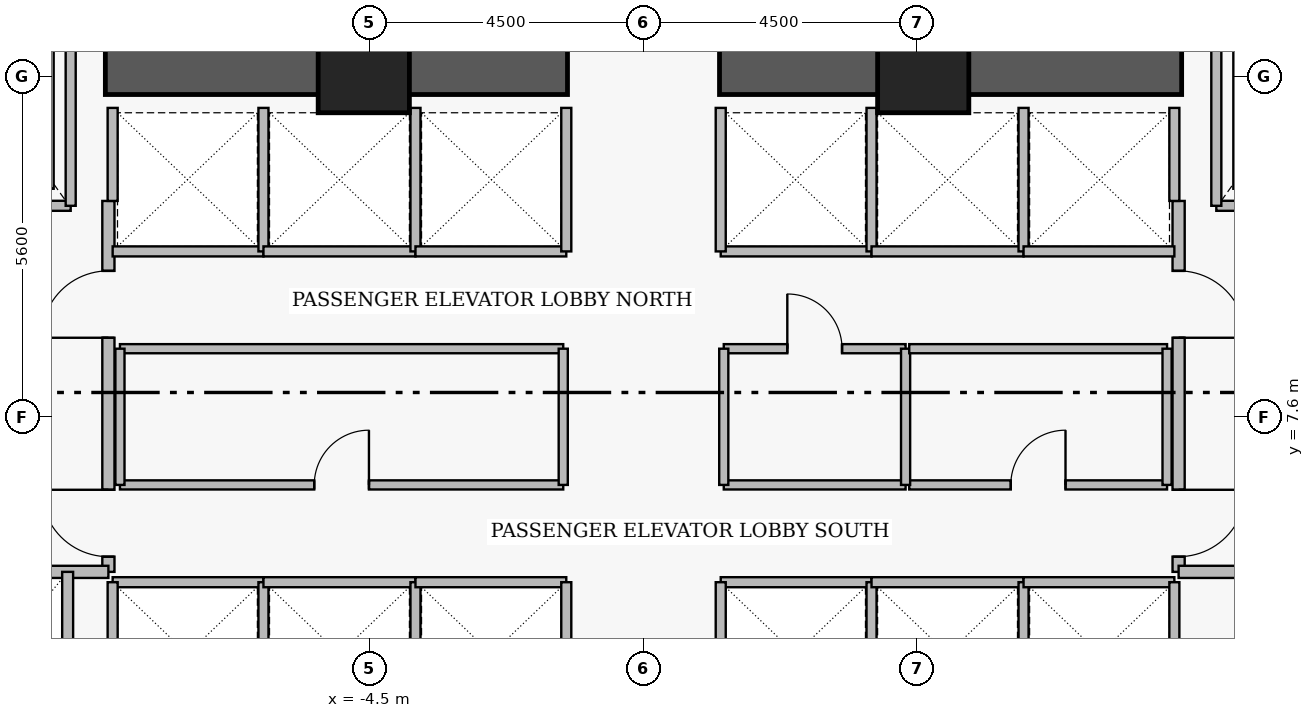
"""IFC4 building model, lengths in metres.
Left out: names, types, materials, properties, quantities, classifications, styles, units other than length and angle.
Written with IfcOpenShell. Run it as: python <this file> out.ifc"""

import sys

from ifc_helpers import new_model, si_unit, direction, frame, frame_2d, origin, origin_2d, place, context, subcontext, project, spatial, rectangle, extrude, element, fill, save


model = new_model("IFC4")
c1 = context("Model", 3, precision=1e-05, world=origin(), true_north=direction((0.0, 1.0)))
c2 = subcontext(c1, "Body", "Model", "MODEL_VIEW")
j1 = project(units=[si_unit("LENGTHUNIT", "METRE"), si_unit("PLANEANGLEUNIT", "RADIAN")], contexts=[c1])
p1 = place(None, origin())
s1 = spatial("IfcSite", under=j1, at=p1, CompositionType="ELEMENT")
p2 = place(p1, origin())
s2 = spatial("IfcBuilding", under=s1, at=p2, CompositionType="ELEMENT")
p3 = place(p2, frame((0.0, 0.0, 89.65)))
s3 = spatial("IfcBuildingStorey", under=s2, at=p3, CompositionType="ELEMENT", Elevation=89.65)
for number, where, z_axis, x_axis in (
    (1, (-8.85, 13.35, 0.0), (0.0, 0.0, 1.0), (1.0, 0.0, 0.0)),
    (2, (1.25, 13.35, 0.0), (0.0, 0.0, 1.0), (1.0, 0.0, 0.0)),
):
    element("IfcWall", number, at=place(p3, frame(where, z_axis=z_axis, x_axis=x_axis)), inside=s3, PredefinedType="SHEAR", context=c2, shape_type="SweptSolid", body=[
        extrude(rectangle(XDim=7.6, YDim=0.9, at=frame_2d((3.8, 0.0))), origin(), (0.0, 0.0, 1.0), 5.74),
    ])
for number, where, z_axis, x_axis in (
    (3, (-4.6, 13.35, 0.0), (0.0, 0.0, 1.0), (1.0, 0.0, 0.0)),
    (4, (4.6, 13.35, 0.0), (0.0, 0.0, 1.0), (1.0, 0.0, 0.0)),
):
    element("IfcColumn", number, at=place(p3, frame(where, z_axis=z_axis, x_axis=x_axis)), inside=s3, PredefinedType="COLUMN", context=c2, shape_type="SweptSolid", body=[
        extrude(rectangle(XDim=1.5, YDim=1.5, at=origin_2d()), origin(), (0.0, 0.0, 1.0), 6.0),
    ])
p4 = place(p3, frame((-8.8, 5.05, 0.0), z_axis=(0.0, 0.0, 1.0), x_axis=(0.0, 1.0, 0.0)))
e5 = element("IfcWall", 5, at=p4, inside=s3, PredefinedType="PARTITIONING", context=c2, shape_type="SweptSolid", body=[
    extrude(rectangle(XDim=6.1, YDim=0.2, at=frame_2d((3.05, 0.0))), origin(), (0.0, 0.0, 1.0), 5.74),
])
p5 = place(p4, frame((0.25, 0.0, 0.0)))
e6 = element("IfcOpeningElement", 6, at=p5, cuts=e5, PredefinedType="OPENING", context=c2, shape_type="SweptSolid", body=[
    extrude(rectangle(XDim=1.1, YDim=2.2, at=frame_2d((0.55, 1.1))), frame((0.0, 0.11, 0.0), z_axis=(0.0, -1.0, 0.0), x_axis=(1.0, 0.0, 0.0)), (0.0, 0.0, 1.0), 0.22),
])
p6 = place(p4, frame((3.85, 0.0, 0.0)))
e7 = element("IfcOpeningElement", 7, at=p6, cuts=e5, PredefinedType="OPENING", context=c2, shape_type="SweptSolid", body=[
    extrude(rectangle(XDim=1.1, YDim=2.2, at=frame_2d((0.55, 1.1))), frame((0.0, 0.11, 0.0), z_axis=(0.0, -1.0, 0.0), x_axis=(1.0, 0.0, 0.0)), (0.0, 0.0, 1.0), 0.22),
])
p7 = place(p3, frame((8.8, 11.15, 0.0), z_axis=(0.0, 0.0, 1.0), x_axis=(0.0, -1.0, 0.0)))
e8 = element("IfcWall", 8, at=p7, inside=s3, PredefinedType="PARTITIONING", context=c2, shape_type="SweptSolid", body=[
    extrude(rectangle(XDim=6.1, YDim=0.2, at=frame_2d((3.05, 0.0))), origin(), (0.0, 0.0, 1.0), 5.74),
])
p8 = place(p7, frame((1.15, 0.0, 0.0)))
e9 = element("IfcOpeningElement", 9, at=p8, cuts=e8, PredefinedType="OPENING", context=c2, shape_type="SweptSolid", body=[
    extrude(rectangle(XDim=1.1, YDim=2.2, at=frame_2d((0.55, 1.1))), frame((0.0, 0.11, 0.0), z_axis=(0.0, -1.0, 0.0), x_axis=(1.0, 0.0, 0.0)), (0.0, 0.0, 1.0), 0.22),
])
p9 = place(p7, frame((4.75, 0.0, 0.0)))
e10 = element("IfcOpeningElement", 10, at=p9, cuts=e8, PredefinedType="OPENING", context=c2, shape_type="SweptSolid", body=[
    extrude(rectangle(XDim=1.1, YDim=2.2, at=frame_2d((0.55, 1.1))), frame((0.0, 0.11, 0.0), z_axis=(0.0, -1.0, 0.0), x_axis=(1.0, 0.0, 0.0)), (0.0, 0.0, 1.0), 0.22),
])
p10 = place(p3, frame((-11.58, 11.07, 0.0), z_axis=(0.0, 0.0, 1.0), x_axis=(1.0, 0.0, 0.0)))
e11 = element("IfcWall", 11, at=p10, inside=s3, PredefinedType="PARTITIONING", context=c2, shape_type="SweptSolid", body=[
    extrude(rectangle(XDim=2.16, YDim=0.165, at=frame_2d((1.08, 0.0))), origin(), (0.0, 0.0, 1.0), 5.74),
])
p11 = place(p10, frame((0.53, 0.0, 0.0)))
e12 = element("IfcOpeningElement", 12, at=p11, cuts=e11, PredefinedType="OPENING", context=c2, shape_type="SweptSolid", body=[
    extrude(rectangle(XDim=1.15, YDim=2.25, at=frame_2d((0.575, 1.125))), frame((0.0, 0.093, 0.0), z_axis=(0.0, -1.0, 0.0), x_axis=(1.0, 0.0, 0.0)), (0.0, 0.0, 1.0), 0.185),
])
p12 = place(p3, frame((9.42, 11.07, 0.0), z_axis=(0.0, 0.0, 1.0), x_axis=(1.0, 0.0, 0.0)))
e13 = element("IfcWall", 13, at=p12, inside=s3, PredefinedType="PARTITIONING", context=c2, shape_type="SweptSolid", body=[
    extrude(rectangle(XDim=2.16, YDim=0.165, at=frame_2d((1.08, 0.0))), origin(), (0.0, 0.0, 1.0), 5.74),
])
p13 = place(p12, frame((0.53, 0.0, 0.0)))
e14 = element("IfcOpeningElement", 14, at=p13, cuts=e13, PredefinedType="OPENING", context=c2, shape_type="SweptSolid", body=[
    extrude(rectangle(XDim=1.15, YDim=2.25, at=frame_2d((0.575, 1.125))), frame((0.0, 0.093, 0.0), z_axis=(0.0, -1.0, 0.0), x_axis=(1.0, 0.0, 0.0)), (0.0, 0.0, 1.0), 0.185),
])
p14 = place(p3, frame((-8.61, 6.48, 0.0), z_axis=(0.0, 0.0, 1.0), x_axis=(1.0, 0.0, 0.0)))
e15 = element("IfcWall", 15, at=p14, inside=s3, PredefinedType="PARTITIONING", context=c2, shape_type="SweptSolid", body=[
    extrude(rectangle(XDim=7.29, YDim=0.15, at=frame_2d((3.645, 0.0))), origin(), (0.0, 0.0, 1.0), 5.74),
])
p15 = place(p14, frame((3.195, 0.0, 0.0)))
e16 = element("IfcOpeningElement", 16, at=p15, cuts=e15, PredefinedType="OPENING", context=c2, shape_type="SweptSolid", body=[
    extrude(rectangle(XDim=0.9, YDim=2.15, at=frame_2d((0.45, 1.075))), frame((0.0, 0.085, 0.0), z_axis=(0.0, -1.0, 0.0), x_axis=(1.0, 0.0, 0.0)), (0.0, 0.0, 1.0), 0.17),
])
p16 = place(p3, frame((1.32, 8.72, 0.0), z_axis=(0.0, 0.0, 1.0), x_axis=(1.0, 0.0, 0.0)))
e17 = element("IfcWall", 17, at=p16, inside=s3, PredefinedType="PARTITIONING", context=c2, shape_type="SweptSolid", body=[
    extrude(rectangle(XDim=2.99, YDim=0.15, at=frame_2d((1.495, 0.0))), origin(), (0.0, 0.0, 1.0), 5.74),
])
p17 = place(p16, frame((1.045, 0.0, 0.0)))
e18 = element("IfcOpeningElement", 18, at=p17, cuts=e17, PredefinedType="OPENING", context=c2, shape_type="SweptSolid", body=[
    extrude(rectangle(XDim=0.9, YDim=2.15, at=frame_2d((0.45, 1.075))), frame((0.0, 0.085, 0.0), z_axis=(0.0, -1.0, 0.0), x_axis=(1.0, 0.0, 0.0)), (0.0, 0.0, 1.0), 0.17),
])
p18 = place(p3, frame((4.37, 6.48, 0.0), z_axis=(0.0, 0.0, 1.0), x_axis=(1.0, 0.0, 0.0)))
e19 = element("IfcWall", 19, at=p18, inside=s3, PredefinedType="PARTITIONING", context=c2, shape_type="SweptSolid", body=[
    extrude(rectangle(XDim=4.24, YDim=0.15, at=frame_2d((2.12, 0.0))), origin(), (0.0, 0.0, 1.0), 5.74),
])
p19 = place(p18, frame((1.67, 0.0, 0.0)))
e20 = element("IfcOpeningElement", 20, at=p19, cuts=e19, PredefinedType="OPENING", context=c2, shape_type="SweptSolid", body=[
    extrude(rectangle(XDim=0.9, YDim=2.15, at=frame_2d((0.45, 1.075))), frame((0.0, 0.085, 0.0), z_axis=(0.0, -1.0, 0.0), x_axis=(1.0, 0.0, 0.0)), (0.0, 0.0, 1.0), 0.17),
])
for number, where, z_axis, x_axis in (
    (21, (-11.65, 5.05, 0.0), (0.0, 0.0, 1.0), (1.0, 0.0, 0.0)),
    (22, (8.8, 5.05, 0.0), (0.0, 0.0, 1.0), (1.0, 0.0, 0.0)),
):
    element("IfcWall", number, at=place(p3, frame(where, z_axis=z_axis, x_axis=x_axis)), inside=s3, PredefinedType="PARTITIONING", context=c2, shape_type="SweptSolid", body=[
        extrude(rectangle(XDim=2.85, YDim=0.2, at=frame_2d((1.425, 0.0))), origin(), (0.0, 0.0, 1.0), 5.74),
    ])
for number, where, z_axis, x_axis in (
    (23, (-9.42, 11.07, 0.0), (0.0, 0.0, 1.0), (0.0, 1.0, 0.0)),
    (24, (9.42, 11.07, 0.0), (0.0, 0.0, 1.0), (0.0, 1.0, 0.0)),
):
    element("IfcWall", number, at=place(p3, frame(where, z_axis=z_axis, x_axis=x_axis)), inside=s3, PredefinedType="PARTITIONING", context=c2, shape_type="SweptSolid", body=[
        extrude(rectangle(XDim=2.96, YDim=0.165, at=frame_2d((1.48, 0.0))), origin(), (0.0, 0.0, 1.0), 5.74),
    ])
p20 = place(p3, frame((-8.73, 4.88, 0.0), z_axis=(0.0, 0.0, 1.0), x_axis=(1.0, 0.0, 0.0)))
e25 = element("IfcWall", 25, at=p20, inside=s3, PredefinedType="PARTITIONING", context=c2, shape_type="SweptSolid", body=[
    extrude(rectangle(XDim=2.48, YDim=0.165, at=frame_2d((1.24, 0.0))), origin(), (0.0, 0.0, 1.0), 5.74),
])
for number, where, z_axis, x_axis in (
    (26, (-8.73, 2.52, 0.0), (0.0, 0.0, 1.0), (0.0, 1.0, 0.0)),
    (27, (-6.25, 2.52, 0.0), (0.0, 0.0, 1.0), (0.0, 1.0, 0.0)),
):
    element("IfcWall", number, at=place(p3, frame(where, z_axis=z_axis, x_axis=x_axis)), inside=s3, PredefinedType="PARTITIONING", context=c2, shape_type="SweptSolid", body=[
        extrude(rectangle(XDim=2.36, YDim=0.165, at=frame_2d((1.18, 0.0))), origin(), (0.0, 0.0, 1.0), 5.74),
    ])
p21 = place(p3, frame((-6.25, 4.88, 0.0), z_axis=(0.0, 0.0, 1.0), x_axis=(1.0, 0.0, 0.0)))
e28 = element("IfcWall", 28, at=p21, inside=s3, PredefinedType="PARTITIONING", context=c2, shape_type="SweptSolid", body=[
    extrude(rectangle(XDim=2.5, YDim=0.165, at=frame_2d((1.25, 0.0))), origin(), (0.0, 0.0, 1.0), 5.74),
])
p22 = place(p3, frame((-3.75, 2.52, 0.0), z_axis=(0.0, 0.0, 1.0), x_axis=(0.0, 1.0, 0.0)))
e29 = element("IfcWall", 29, at=p22, inside=s3, PredefinedType="PARTITIONING", context=c2, shape_type="SweptSolid", body=[
    extrude(rectangle(XDim=2.36, YDim=0.165, at=frame_2d((1.18, 0.0))), origin(), (0.0, 0.0, 1.0), 5.74),
])
p23 = place(p3, frame((-8.73, 10.32, 0.0), z_axis=(0.0, 0.0, 1.0), x_axis=(1.0, 0.0, 0.0)))
e30 = element("IfcWall", 30, at=p23, inside=s3, PredefinedType="PARTITIONING", context=c2, shape_type="SweptSolid", body=[
    extrude(rectangle(XDim=2.48, YDim=0.165, at=frame_2d((1.24, 0.0))), origin(), (0.0, 0.0, 1.0), 5.74),
])
p24 = place(p3, frame((-8.73, 11.15, 0.0), z_axis=(0.0, 0.0, 1.0), x_axis=(0.0, 1.0, 0.0)))
e31 = element("IfcWall", 31, at=p24, inside=s3, PredefinedType="PARTITIONING", context=c2, shape_type="SweptSolid", body=[
    extrude(rectangle(XDim=1.53, YDim=0.165, at=frame_2d((0.765, 0.0))), origin(), (0.0, 0.0, 1.0), 5.74),
])
p25 = place(p3, frame((-6.25, 10.32, 0.0), z_axis=(0.0, 0.0, 1.0), x_axis=(0.0, 1.0, 0.0)))
e32 = element("IfcWall", 32, at=p25, inside=s3, PredefinedType="PARTITIONING", context=c2, shape_type="SweptSolid", body=[
    extrude(rectangle(XDim=2.36, YDim=0.165, at=frame_2d((1.18, 0.0))), origin(), (0.0, 0.0, 1.0), 5.74),
])
p26 = place(p3, frame((-6.25, 10.32, 0.0), z_axis=(0.0, 0.0, 1.0), x_axis=(1.0, 0.0, 0.0)))
e33 = element("IfcWall", 33, at=p26, inside=s3, PredefinedType="PARTITIONING", context=c2, shape_type="SweptSolid", body=[
    extrude(rectangle(XDim=2.5, YDim=0.165, at=frame_2d((1.25, 0.0))), origin(), (0.0, 0.0, 1.0), 5.74),
])
p27 = place(p3, frame((-3.75, 10.32, 0.0), z_axis=(0.0, 0.0, 1.0), x_axis=(0.0, 1.0, 0.0)))
e34 = element("IfcWall", 34, at=p27, inside=s3, PredefinedType="PARTITIONING", context=c2, shape_type="SweptSolid", body=[
    extrude(rectangle(XDim=2.36, YDim=0.165, at=frame_2d((1.18, 0.0))), origin(), (0.0, 0.0, 1.0), 5.74),
])
p28 = place(p3, frame((-3.75, 4.88, 0.0), z_axis=(0.0, 0.0, 1.0), x_axis=(1.0, 0.0, 0.0)))
e35 = element("IfcWall", 35, at=p28, inside=s3, PredefinedType="PARTITIONING", context=c2, shape_type="SweptSolid", body=[
    extrude(rectangle(XDim=2.48, YDim=0.165, at=frame_2d((1.24, 0.0))), origin(), (0.0, 0.0, 1.0), 5.74),
])
p29 = place(p3, frame((-1.27, 2.52, 0.0), z_axis=(0.0, 0.0, 1.0), x_axis=(0.0, 1.0, 0.0)))
e36 = element("IfcWall", 36, at=p29, inside=s3, PredefinedType="PARTITIONING", context=c2, shape_type="SweptSolid", body=[
    extrude(rectangle(XDim=2.36, YDim=0.165, at=frame_2d((1.18, 0.0))), origin(), (0.0, 0.0, 1.0), 5.74),
])
p30 = place(p3, frame((1.27, 4.88, 0.0), z_axis=(0.0, 0.0, 1.0), x_axis=(1.0, 0.0, 0.0)))
e37 = element("IfcWall", 37, at=p30, inside=s3, PredefinedType="PARTITIONING", context=c2, shape_type="SweptSolid", body=[
    extrude(rectangle(XDim=2.48, YDim=0.165, at=frame_2d((1.24, 0.0))), origin(), (0.0, 0.0, 1.0), 5.74),
])
for number, where, z_axis, x_axis in (
    (38, (1.27, 2.52, 0.0), (0.0, 0.0, 1.0), (0.0, 1.0, 0.0)),
    (39, (3.75, 2.52, 0.0), (0.0, 0.0, 1.0), (0.0, 1.0, 0.0)),
):
    element("IfcWall", number, at=place(p3, frame(where, z_axis=z_axis, x_axis=x_axis)), inside=s3, PredefinedType="PARTITIONING", context=c2, shape_type="SweptSolid", body=[
        extrude(rectangle(XDim=2.36, YDim=0.165, at=frame_2d((1.18, 0.0))), origin(), (0.0, 0.0, 1.0), 5.74),
    ])
p31 = place(p3, frame((-3.75, 10.32, 0.0), z_axis=(0.0, 0.0, 1.0), x_axis=(1.0, 0.0, 0.0)))
e40 = element("IfcWall", 40, at=p31, inside=s3, PredefinedType="PARTITIONING", context=c2, shape_type="SweptSolid", body=[
    extrude(rectangle(XDim=2.48, YDim=0.165, at=frame_2d((1.24, 0.0))), origin(), (0.0, 0.0, 1.0), 5.74),
])
p32 = place(p3, frame((-1.27, 10.32, 0.0), z_axis=(0.0, 0.0, 1.0), x_axis=(0.0, 1.0, 0.0)))
e41 = element("IfcWall", 41, at=p32, inside=s3, PredefinedType="PARTITIONING", context=c2, shape_type="SweptSolid", body=[
    extrude(rectangle(XDim=2.36, YDim=0.165, at=frame_2d((1.18, 0.0))), origin(), (0.0, 0.0, 1.0), 5.74),
])
p33 = place(p3, frame((1.27, 10.32, 0.0), z_axis=(0.0, 0.0, 1.0), x_axis=(1.0, 0.0, 0.0)))
e42 = element("IfcWall", 42, at=p33, inside=s3, PredefinedType="PARTITIONING", context=c2, shape_type="SweptSolid", body=[
    extrude(rectangle(XDim=2.48, YDim=0.165, at=frame_2d((1.24, 0.0))), origin(), (0.0, 0.0, 1.0), 5.74),
])
for number, where, z_axis, x_axis in (
    (43, (1.27, 10.32, 0.0), (0.0, 0.0, 1.0), (0.0, 1.0, 0.0)),
    (44, (3.75, 10.32, 0.0), (0.0, 0.0, 1.0), (0.0, 1.0, 0.0)),
):
    element("IfcWall", number, at=place(p3, frame(where, z_axis=z_axis, x_axis=x_axis)), inside=s3, PredefinedType="PARTITIONING", context=c2, shape_type="SweptSolid", body=[
        extrude(rectangle(XDim=2.36, YDim=0.165, at=frame_2d((1.18, 0.0))), origin(), (0.0, 0.0, 1.0), 5.74),
    ])
p34 = place(p3, frame((3.75, 4.88, 0.0), z_axis=(0.0, 0.0, 1.0), x_axis=(1.0, 0.0, 0.0)))
e45 = element("IfcWall", 45, at=p34, inside=s3, PredefinedType="PARTITIONING", context=c2, shape_type="SweptSolid", body=[
    extrude(rectangle(XDim=2.5, YDim=0.165, at=frame_2d((1.25, 0.0))), origin(), (0.0, 0.0, 1.0), 5.74),
])
p35 = place(p3, frame((6.25, 2.52, 0.0), z_axis=(0.0, 0.0, 1.0), x_axis=(0.0, 1.0, 0.0)))
e46 = element("IfcWall", 46, at=p35, inside=s3, PredefinedType="PARTITIONING", context=c2, shape_type="SweptSolid", body=[
    extrude(rectangle(XDim=2.36, YDim=0.165, at=frame_2d((1.18, 0.0))), origin(), (0.0, 0.0, 1.0), 5.74),
])
p36 = place(p3, frame((6.25, 4.88, 0.0), z_axis=(0.0, 0.0, 1.0), x_axis=(1.0, 0.0, 0.0)))
e47 = element("IfcWall", 47, at=p36, inside=s3, PredefinedType="PARTITIONING", context=c2, shape_type="SweptSolid", body=[
    extrude(rectangle(XDim=2.48, YDim=0.165, at=frame_2d((1.24, 0.0))), origin(), (0.0, 0.0, 1.0), 5.74),
])
p37 = place(p3, frame((8.73, 2.52, 0.0), z_axis=(0.0, 0.0, 1.0), x_axis=(0.0, 1.0, 0.0)))
e48 = element("IfcWall", 48, at=p37, inside=s3, PredefinedType="PARTITIONING", context=c2, shape_type="SweptSolid", body=[
    extrude(rectangle(XDim=2.36, YDim=0.165, at=frame_2d((1.18, 0.0))), origin(), (0.0, 0.0, 1.0), 5.74),
])
p38 = place(p3, frame((3.75, 10.32, 0.0), z_axis=(0.0, 0.0, 1.0), x_axis=(1.0, 0.0, 0.0)))
e49 = element("IfcWall", 49, at=p38, inside=s3, PredefinedType="PARTITIONING", context=c2, shape_type="SweptSolid", body=[
    extrude(rectangle(XDim=2.5, YDim=0.165, at=frame_2d((1.25, 0.0))), origin(), (0.0, 0.0, 1.0), 5.74),
])
p39 = place(p3, frame((6.25, 10.32, 0.0), z_axis=(0.0, 0.0, 1.0), x_axis=(0.0, 1.0, 0.0)))
e50 = element("IfcWall", 50, at=p39, inside=s3, PredefinedType="PARTITIONING", context=c2, shape_type="SweptSolid", body=[
    extrude(rectangle(XDim=2.36, YDim=0.165, at=frame_2d((1.18, 0.0))), origin(), (0.0, 0.0, 1.0), 5.74),
])
p40 = place(p3, frame((6.25, 10.32, 0.0), z_axis=(0.0, 0.0, 1.0), x_axis=(1.0, 0.0, 0.0)))
e51 = element("IfcWall", 51, at=p40, inside=s3, PredefinedType="PARTITIONING", context=c2, shape_type="SweptSolid", body=[
    extrude(rectangle(XDim=2.48, YDim=0.165, at=frame_2d((1.24, 0.0))), origin(), (0.0, 0.0, 1.0), 5.74),
])
p41 = place(p3, frame((8.73, 11.15, 0.0), z_axis=(0.0, 0.0, 1.0), x_axis=(0.0, 1.0, 0.0)))
e52 = element("IfcWall", 52, at=p41, inside=s3, PredefinedType="PARTITIONING", context=c2, shape_type="SweptSolid", body=[
    extrude(rectangle(XDim=1.53, YDim=0.165, at=frame_2d((0.765, 0.0))), origin(), (0.0, 0.0, 1.0), 5.74),
])
p42 = place(p3, frame((-9.47, 2.45, 0.0), z_axis=(0.0, 0.0, 1.0), x_axis=(0.0, 1.0, 0.0)))
e53 = element("IfcWall", 53, at=p42, inside=s3, PredefinedType="PARTITIONING", context=c2, shape_type="SweptSolid", body=[
    extrude(rectangle(XDim=2.6, YDim=0.18, at=frame_2d((1.3, 0.0))), origin(), (0.0, 0.0, 1.0), 5.74),
])
p43 = place(p3, frame((-8.61, 8.72, 0.0), z_axis=(0.0, 0.0, 1.0), x_axis=(1.0, 0.0, 0.0)))
e54 = element("IfcWall", 54, at=p43, inside=s3, PredefinedType="PARTITIONING", context=c2, shape_type="SweptSolid", body=[
    extrude(rectangle(XDim=7.29, YDim=0.15, at=frame_2d((3.645, 0.0))), origin(), (0.0, 0.0, 1.0), 5.74),
])
for number, where, z_axis, x_axis in (
    (55, (-8.61, 6.48, 0.0), (0.0, 0.0, 1.0), (0.0, 1.0, 0.0)),
    (56, (-1.32, 6.48, 0.0), (0.0, 0.0, 1.0), (0.0, 1.0, 0.0)),
):
    element("IfcWall", number, at=place(p3, frame(where, z_axis=z_axis, x_axis=x_axis)), inside=s3, PredefinedType="PARTITIONING", context=c2, shape_type="SweptSolid", body=[
        extrude(rectangle(XDim=2.24, YDim=0.15, at=frame_2d((1.12, 0.0))), origin(), (0.0, 0.0, 1.0), 5.74),
    ])
p44 = place(p3, frame((1.32, 6.48, 0.0), z_axis=(0.0, 0.0, 1.0), x_axis=(1.0, 0.0, 0.0)))
e57 = element("IfcWall", 57, at=p44, inside=s3, PredefinedType="PARTITIONING", context=c2, shape_type="SweptSolid", body=[
    extrude(rectangle(XDim=2.99, YDim=0.15, at=frame_2d((1.495, 0.0))), origin(), (0.0, 0.0, 1.0), 5.74),
])
for number, where, z_axis, x_axis in (
    (58, (1.32, 6.48, 0.0), (0.0, 0.0, 1.0), (0.0, 1.0, 0.0)),
    (59, (4.31, 6.48, 0.0), (0.0, 0.0, 1.0), (0.0, 1.0, 0.0)),
):
    element("IfcWall", number, at=place(p3, frame(where, z_axis=z_axis, x_axis=x_axis)), inside=s3, PredefinedType="PARTITIONING", context=c2, shape_type="SweptSolid", body=[
        extrude(rectangle(XDim=2.24, YDim=0.15, at=frame_2d((1.12, 0.0))), origin(), (0.0, 0.0, 1.0), 5.74),
    ])
p45 = place(p3, frame((4.37, 8.72, 0.0), z_axis=(0.0, 0.0, 1.0), x_axis=(1.0, 0.0, 0.0)))
e60 = element("IfcWall", 60, at=p45, inside=s3, PredefinedType="PARTITIONING", context=c2, shape_type="SweptSolid", body=[
    extrude(rectangle(XDim=4.24, YDim=0.15, at=frame_2d((2.12, 0.0))), origin(), (0.0, 0.0, 1.0), 5.74),
])
p46 = place(p3, frame((8.61, 6.48, 0.0), z_axis=(0.0, 0.0, 1.0), x_axis=(0.0, 1.0, 0.0)))
e61 = element("IfcWall", 61, at=p46, inside=s3, PredefinedType="PARTITIONING", context=c2, shape_type="SweptSolid", body=[
    extrude(rectangle(XDim=2.24, YDim=0.15, at=frame_2d((1.12, 0.0))), origin(), (0.0, 0.0, 1.0), 5.74),
])
p47 = place(p5, origin())
e62 = element("IfcDoor", 62, at=p47, inside=s3, OperationType="SINGLE_SWING_RIGHT", PredefinedType="DOOR", context=c2, shape_type="SweptSolid", body=[
    extrude(rectangle(XDim=1.1, YDim=2.2, at=frame_2d((0.55, 1.1))), frame((0.0, 0.025, 0.0), z_axis=(0.0, -1.0, 0.0), x_axis=(1.0, 0.0, 0.0)), (0.0, 0.0, 1.0), 0.05),
])
fill(e6, e62)
p48 = place(p6, origin())
e63 = element("IfcDoor", 63, at=p48, inside=s3, OperationType="SINGLE_SWING_LEFT", PredefinedType="DOOR", context=c2, shape_type="SweptSolid", body=[
    extrude(rectangle(XDim=1.1, YDim=2.2, at=frame_2d((0.55, 1.1))), frame((0.0, 0.025, 0.0), z_axis=(0.0, -1.0, 0.0), x_axis=(1.0, 0.0, 0.0)), (0.0, 0.0, 1.0), 0.05),
])
fill(e7, e63)
p49 = place(p8, origin())
e64 = element("IfcDoor", 64, at=p49, inside=s3, OperationType="SINGLE_SWING_RIGHT", PredefinedType="DOOR", context=c2, shape_type="SweptSolid", body=[
    extrude(rectangle(XDim=1.1, YDim=2.2, at=frame_2d((0.55, 1.1))), frame((0.0, 0.025, 0.0), z_axis=(0.0, -1.0, 0.0), x_axis=(1.0, 0.0, 0.0)), (0.0, 0.0, 1.0), 0.05),
])
fill(e9, e64)
p50 = place(p9, origin())
e65 = element("IfcDoor", 65, at=p50, inside=s3, OperationType="SINGLE_SWING_LEFT", PredefinedType="DOOR", context=c2, shape_type="SweptSolid", body=[
    extrude(rectangle(XDim=1.1, YDim=2.2, at=frame_2d((0.55, 1.1))), frame((0.0, 0.025, 0.0), z_axis=(0.0, -1.0, 0.0), x_axis=(1.0, 0.0, 0.0)), (0.0, 0.0, 1.0), 0.05),
])
fill(e10, e65)
p51 = place(p15, origin())
e66 = element("IfcDoor", 66, at=p51, inside=s3, OperationType="SINGLE_SWING_RIGHT", PredefinedType="DOOR", context=c2, shape_type="SweptSolid", body=[
    extrude(rectangle(XDim=0.9, YDim=2.15, at=frame_2d((0.45, 1.075))), frame((0.0, 0.025, 0.0), z_axis=(0.0, -1.0, 0.0), x_axis=(1.0, 0.0, 0.0)), (0.0, 0.0, 1.0), 0.05),
])
fill(e16, e66)
p52 = place(p17, origin())
e67 = element("IfcDoor", 67, at=p52, inside=s3, OperationType="SINGLE_SWING_LEFT", PredefinedType="DOOR", context=c2, shape_type="SweptSolid", body=[
    extrude(rectangle(XDim=0.9, YDim=2.15, at=frame_2d((0.45, 1.075))), frame((0.0, 0.025, 0.0), z_axis=(0.0, -1.0, 0.0), x_axis=(1.0, 0.0, 0.0)), (0.0, 0.0, 1.0), 0.05),
])
fill(e18, e67)
p53 = place(p19, origin())
e68 = element("IfcDoor", 68, at=p53, inside=s3, OperationType="SINGLE_SWING_RIGHT", PredefinedType="DOOR", context=c2, shape_type="SweptSolid", body=[
    extrude(rectangle(XDim=0.9, YDim=2.15, at=frame_2d((0.45, 1.075))), frame((0.0, 0.025, 0.0), z_axis=(0.0, -1.0, 0.0), x_axis=(1.0, 0.0, 0.0)), (0.0, 0.0, 1.0), 0.05),
])
fill(e20, e68)
save(model, sys.argv[1])
